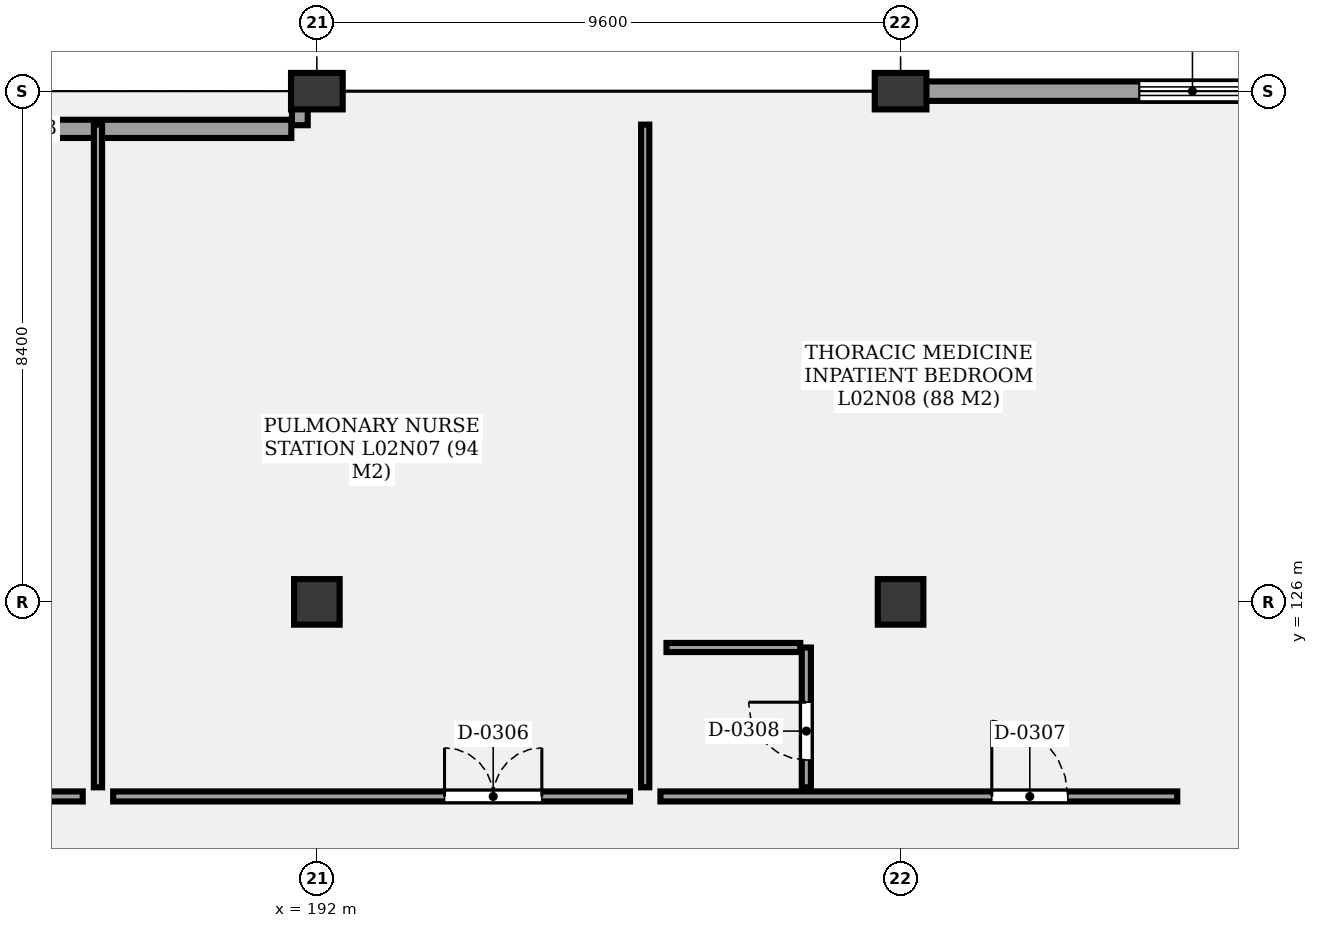
"""IFC4 building model, lengths in metres.
Left out: names, types, materials, properties, quantities, classifications, styles, units other than length and angle.
Written with IfcOpenShell. Run it as: python <this file> out.ifc"""

import sys

from ifc_helpers import new_model, si_unit, direction, frame, frame_2d, origin, origin_2d, place, context, subcontext, project, spatial, rectangle, extrude, element, fill, save


model = new_model("IFC4")
c1 = context("Model", 3, precision=1e-05, world=origin(), true_north=direction((0.0, 1.0)))
c2 = subcontext(c1, "Body", "Model", "MODEL_VIEW")
j1 = project(units=[si_unit("LENGTHUNIT", "METRE"), si_unit("PLANEANGLEUNIT", "RADIAN")], contexts=[c1])
p1 = place(None, origin())
s1 = spatial("IfcSite", under=j1, at=p1, CompositionType="ELEMENT")
p2 = place(p1, origin())
s2 = spatial("IfcBuilding", under=s1, at=p2, CompositionType="ELEMENT")
p3 = place(p2, frame((0.0, 0.0, 9.9)))
s3 = spatial("IfcBuildingStorey", under=s2, at=p3, CompositionType="ELEMENT", Elevation=9.9)
p4 = place(p3, frame((192.0, 126.0, 0.0), z_axis=(0.0, 0.0, 1.0), x_axis=(1.0, 0.0, 0.0)))
e1 = element("IfcColumn", 1, at=p4, inside=s3, PredefinedType="COLUMN", context=c2, shape_type="SweptSolid", body=[
    extrude(rectangle(XDim=0.75, YDim=0.75, at=origin_2d()), origin(), (0.0, 0.0, 1.0), 3.6),
])
p5 = place(p3, frame((192.0, 134.4, 0.0), z_axis=(0.0, 0.0, 1.0), x_axis=(1.0, 0.0, 0.0)))
e2 = element("IfcColumn", 2, at=p5, inside=s3, PredefinedType="COLUMN", context=c2, shape_type="SweptSolid", body=[
    extrude(rectangle(XDim=0.85, YDim=0.6, at=origin_2d()), origin(), (0.0, 0.0, 1.0), 3.6),
])
p6 = place(p3, frame((201.6, 126.0, 0.0), z_axis=(0.0, 0.0, 1.0), x_axis=(1.0, 0.0, 0.0)))
e3 = element("IfcColumn", 3, at=p6, inside=s3, PredefinedType="COLUMN", context=c2, shape_type="SweptSolid", body=[
    extrude(rectangle(XDim=0.75, YDim=0.75, at=origin_2d()), origin(), (0.0, 0.0, 1.0), 3.6),
])
p7 = place(p3, frame((201.6, 134.4, 0.0), z_axis=(0.0, 0.0, 1.0), x_axis=(1.0, 0.0, 0.0)))
e4 = element("IfcColumn", 4, at=p7, inside=s3, PredefinedType="COLUMN", context=c2, shape_type="SweptSolid", body=[
    extrude(rectangle(XDim=0.85, YDim=0.6, at=origin_2d()), origin(), (0.0, 0.0, 1.0), 3.6),
])
p8 = place(p3, frame((191.72, 134.2, 0.0), z_axis=(0.0, 0.0, 1.0), x_axis=(0.0, -1.0, 0.0)))
e5 = element("IfcWall", 5, at=p8, inside=s3, PredefinedType="SOLIDWALL", context=c2, shape_type="SweptSolid", body=[
    extrude(rectangle(XDim=0.36, YDim=0.26, at=frame_2d((0.18, 0.0))), origin(), (0.0, 0.0, 1.0), 2.57),
])
p9 = place(p3, frame((182.82, 133.78, 0.0), z_axis=(0.0, 0.0, 1.0), x_axis=(1.0, 0.0, 0.0)))
e6 = element("IfcWall", 6, at=p9, inside=s3, PredefinedType="SOLIDWALL", context=c2, shape_type="SweptSolid", body=[
    extrude(rectangle(XDim=8.76, YDim=0.3, at=frame_2d((4.38, 0.0))), origin(), (0.0, 0.0, 1.0), 2.57),
])
p10 = place(p3, frame((201.6, 134.4, 0.0), z_axis=(0.0, 0.0, 1.0), x_axis=(1.0, 0.0, 0.0)))
e7 = element("IfcWall", 7, at=p10, inside=s3, PredefinedType="SOLIDWALL", context=c2, shape_type="SweptSolid", body=[
    extrude(rectangle(XDim=9.6, YDim=0.32, at=frame_2d((4.8, 0.0))), origin(), (0.0, 0.0, 1.0), 2.57),
])
p11 = place(p10, frame((3.925, 0.0, 0.85)))
e8 = element("IfcOpeningElement", 8, at=p11, cuts=e7, PredefinedType="OPENING", context=c2, shape_type="SweptSolid", body=[
    extrude(rectangle(XDim=1.75, YDim=1.2, at=frame_2d((0.875, 0.6))), frame((0.0, 0.17, 0.0), z_axis=(0.0, -1.0, 0.0), x_axis=(1.0, 0.0, 0.0)), (0.0, 0.0, 1.0), 0.34),
])
p12 = place(p3, frame((179.65, 122.8, 0.0), z_axis=(0.0, 0.0, 1.0), x_axis=(1.0, 0.0, 0.0)))
e9 = element("IfcWall", 9, at=p12, inside=s3, PredefinedType="PARTITIONING", context=c2, shape_type="SweptSolid", body=[
    extrude(rectangle(XDim=8.5, YDim=0.165, at=frame_2d((4.25, 0.0))), origin(), (0.0, 0.0, 1.0), 2.48),
])
p13 = place(p12, frame((5.45, 0.0, 0.0)))
e10 = element("IfcOpeningElement", 10, at=p13, cuts=e9, PredefinedType="OPENING", context=c2, shape_type="SweptSolid", body=[
    extrude(rectangle(XDim=1.25, YDim=2.2, at=frame_2d((0.625, 1.1))), frame((0.0, 0.093, 0.0), z_axis=(0.0, -1.0, 0.0), x_axis=(1.0, 0.0, 0.0)), (0.0, 0.0, 1.0), 0.185),
])
p14 = place(p3, frame((188.65, 122.8, 0.0), z_axis=(0.0, 0.0, 1.0), x_axis=(1.0, 0.0, 0.0)))
e11 = element("IfcWall", 11, at=p14, inside=s3, PredefinedType="PARTITIONING", context=c2, shape_type="SweptSolid", body=[
    extrude(rectangle(XDim=8.5, YDim=0.165, at=frame_2d((4.25, 0.0))), origin(), (0.0, 0.0, 1.0), 2.48),
])
p15 = place(p14, frame((5.45, 0.0, 0.0)))
e12 = element("IfcOpeningElement", 12, at=p15, cuts=e11, PredefinedType="OPENING", context=c2, shape_type="SweptSolid", body=[
    extrude(rectangle(XDim=1.6, YDim=2.2, at=frame_2d((0.8, 1.1))), frame((0.0, 0.093, 0.0), z_axis=(0.0, -1.0, 0.0), x_axis=(1.0, 0.0, 0.0)), (0.0, 0.0, 1.0), 0.185),
])
p16 = place(p3, frame((188.4, 122.95, 0.0), z_axis=(0.0, 0.0, 1.0), x_axis=(0.0, 1.0, 0.0)))
e13 = element("IfcWall", 13, at=p16, inside=s3, PredefinedType="PARTITIONING", context=c2, shape_type="SweptSolid", body=[
    extrude(rectangle(XDim=10.9, YDim=0.135, at=frame_2d((5.45, 0.0))), origin(), (0.0, 0.0, 1.0), 2.48),
])
p17 = place(p3, frame((197.65, 122.8, 0.0), z_axis=(0.0, 0.0, 1.0), x_axis=(1.0, 0.0, 0.0)))
e14 = element("IfcWall", 14, at=p17, inside=s3, PredefinedType="PARTITIONING", context=c2, shape_type="SweptSolid", body=[
    extrude(rectangle(XDim=8.5, YDim=0.165, at=frame_2d((4.25, 0.0))), origin(), (0.0, 0.0, 1.0), 2.48),
])
p18 = place(p17, frame((5.45, 0.0, 0.0)))
e15 = element("IfcOpeningElement", 15, at=p18, cuts=e14, PredefinedType="OPENING", context=c2, shape_type="SweptSolid", body=[
    extrude(rectangle(XDim=1.25, YDim=2.2, at=frame_2d((0.625, 1.1))), frame((0.0, 0.093, 0.0), z_axis=(0.0, -1.0, 0.0), x_axis=(1.0, 0.0, 0.0)), (0.0, 0.0, 1.0), 0.185),
])
p19 = place(p3, frame((200.05, 122.95, 0.0), z_axis=(0.0, 0.0, 1.0), x_axis=(0.0, 1.0, 0.0)))
e16 = element("IfcWall", 16, at=p19, inside=s3, PredefinedType="PARTITIONING", context=c2, shape_type="SweptSolid", body=[
    extrude(rectangle(XDim=2.3, YDim=0.15, at=frame_2d((1.15, 0.0))), origin(), (0.0, 0.0, 1.0), 2.48),
])
p20 = place(p19, frame((0.45, 0.0, 0.0)))
e17 = element("IfcOpeningElement", 17, at=p20, cuts=e16, PredefinedType="OPENING", context=c2, shape_type="SweptSolid", body=[
    extrude(rectangle(XDim=0.95, YDim=2.1, at=frame_2d((0.475, 1.05))), frame((0.0, 0.085, 0.0), z_axis=(0.0, -1.0, 0.0), x_axis=(1.0, 0.0, 0.0)), (0.0, 0.0, 1.0), 0.17),
])
p21 = place(p3, frame((197.75, 125.25, 0.0), z_axis=(0.0, 0.0, 1.0), x_axis=(1.0, 0.0, 0.0)))
e18 = element("IfcWall", 18, at=p21, inside=s3, PredefinedType="PARTITIONING", context=c2, shape_type="SweptSolid", body=[
    extrude(rectangle(XDim=2.2, YDim=0.15, at=frame_2d((1.1, 0.0))), origin(), (0.0, 0.0, 1.0), 2.48),
])
p22 = place(p3, frame((197.4, 122.95, 0.0), z_axis=(0.0, 0.0, 1.0), x_axis=(0.0, 1.0, 0.0)))
e19 = element("IfcWall", 19, at=p22, inside=s3, PredefinedType="PARTITIONING", context=c2, shape_type="SweptSolid", body=[
    extrude(rectangle(XDim=10.9, YDim=0.135, at=frame_2d((5.45, 0.0))), origin(), (0.0, 0.0, 1.0), 2.48),
])
p23 = place(p11, origin())
e20 = element("IfcWindow", 20, at=p23, inside=s3, PartitioningType="SINGLE_PANEL", PredefinedType="WINDOW", context=c2, shape_type="SweptSolid", body=[
    extrude(rectangle(XDim=1.75, YDim=1.2, at=frame_2d((0.875, 0.6))), frame((0.0, 0.03, 0.0), z_axis=(0.0, -1.0, 0.0), x_axis=(1.0, 0.0, 0.0)), (0.0, 0.0, 1.0), 0.06),
])
fill(e8, e20)
p24 = place(p15, origin())
e21 = element("IfcDoor", 21, at=p24, inside=s3, OperationType="DOUBLE_DOOR_SINGLE_SWING", PredefinedType="DOOR", context=c2, shape_type="SweptSolid", body=[
    extrude(rectangle(XDim=1.6, YDim=2.2, at=frame_2d((0.8, 1.1))), frame((0.0, 0.025, 0.0), z_axis=(0.0, -1.0, 0.0), x_axis=(1.0, 0.0, 0.0)), (0.0, 0.0, 1.0), 0.05),
])
fill(e12, e21)
p25 = place(p18, origin())
e22 = element("IfcDoor", 22, at=p25, inside=s3, OperationType="SINGLE_SWING_LEFT", PredefinedType="DOOR", context=c2, shape_type="SweptSolid", body=[
    extrude(rectangle(XDim=1.25, YDim=2.2, at=frame_2d((0.625, 1.1))), frame((0.0, 0.025, 0.0), z_axis=(0.0, -1.0, 0.0), x_axis=(1.0, 0.0, 0.0)), (0.0, 0.0, 1.0), 0.05),
])
fill(e15, e22)
p26 = place(p20, origin())
e23 = element("IfcDoor", 23, at=p26, inside=s3, OperationType="SINGLE_SWING_RIGHT", PredefinedType="DOOR", context=c2, shape_type="SweptSolid", body=[
    extrude(rectangle(XDim=0.95, YDim=2.1, at=frame_2d((0.475, 1.05))), frame((0.0, 0.025, 0.0), z_axis=(0.0, -1.0, 0.0), x_axis=(1.0, 0.0, 0.0)), (0.0, 0.0, 1.0), 0.05),
])
fill(e17, e23)
save(model, sys.argv[1])
